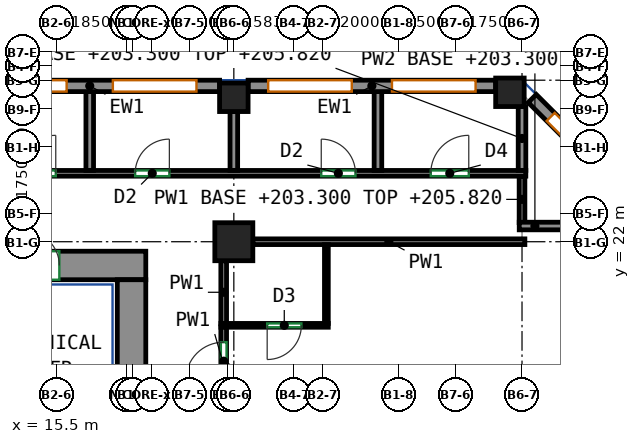
"""IFC4 building model, lengths in metres.
Left out: names, types, materials, properties, quantities, classifications, styles, units other than length and angle.
Written with IfcOpenShell. Run it as: python <this file> out.ifc"""

import sys

from ifc_helpers import new_model, si_unit, direction, frame, frame_2d, origin, origin_2d, place, context, subcontext, project, spatial, rectangle, extrude, source, transform, mapped, element, fill, save


model = new_model("IFC4")
c1 = context("Model", 3, precision=1e-05, world=origin(), true_north=direction((0.0, 1.0)))
c2 = subcontext(c1, "Body", "Model", "MODEL_VIEW")
j1 = project(units=[si_unit("LENGTHUNIT", "METRE"), si_unit("PLANEANGLEUNIT", "RADIAN")], contexts=[c1])
p1 = place(None, origin())
s1 = spatial("IfcSite", under=j1, at=p1, CompositionType="ELEMENT")
p2 = place(p1, origin())
s2 = spatial("IfcBuilding", under=s1, at=p2, CompositionType="ELEMENT")
p3 = place(p2, frame((0.0, 0.0, 203.3)))
s3 = spatial("IfcBuildingStorey", under=s2, at=p3, CompositionType="ELEMENT", Elevation=203.3)
m1 = source(origin(), c2, "Body", "SweptSolid", [
    extrude(rectangle(XDim=1.0, YDim=1.0, at=origin_2d()), origin(), (0.0, 0.0, 1.0), 3.12),
])
p4 = place(p3, frame((20.167, 22.0, 0.0), z_axis=(0.0, 0.0, 1.0), x_axis=(1.0, 0.0, 0.0)))
e1 = element("IfcColumn", 1, at=p4, inside=s3, PredefinedType="COLUMN", context=c2, shape_type="MappedRepresentation", body=[
    mapped(m1, transform((0.0, 0.0, 0.0))),
])
m2 = source(origin(), c2, "Body", "SweptSolid", [
    extrude(rectangle(XDim=0.75, YDim=0.75, at=origin_2d()), origin(), (0.0, 0.0, 1.0), 3.12),
])
for number, where, z_axis, x_axis in (
    (2, (20.167, 25.8, 0.0), (0.0, 0.0, 1.0), (1.0, 0.0, 0.0)),
    (3, (27.432, 25.932, 0.0), (0.0, 0.0, 1.0), (1.0, 0.0, 0.0)),
):
    element("IfcColumn", number, at=place(p3, frame(where, z_axis=z_axis, x_axis=x_axis)), inside=s3, PredefinedType="COLUMN", context=c2, shape_type="MappedRepresentation", body=[
        mapped(m2, transform((0.0, 0.0, 0.0))),
    ])
m3 = source(origin(), c2, "Body", "SweptSolid", [
    extrude(rectangle(XDim=33.6, YDim=0.75, at=frame_2d((16.8, 0.0))), origin(), (0.0, 0.0, 1.0), 3.12),
])
p5 = place(p3, frame((-15.75, 21.375, 0.0), z_axis=(0.0, 0.0, 1.0), x_axis=(1.0, 0.0, 0.0)))
e4 = element("IfcWall", 4, at=p5, inside=s3, PredefinedType="SHEAR", context=c2, shape_type="MappedRepresentation", body=[
    mapped(m3, transform((0.0, 0.0, 0.0))),
])
p6 = place(p5, frame((6.581, 0.0, 0.0)))
e5 = element("IfcOpeningElement", 5, at=p6, cuts=e4, PredefinedType="OPENING", context=c2, shape_type="SweptSolid", body=[
    extrude(rectangle(XDim=0.9, YDim=2.1, at=frame_2d((0.45, 1.05))), frame((0.0, 0.385, 0.0), z_axis=(0.0, -1.0, 0.0), x_axis=(1.0, 0.0, 0.0)), (0.0, 0.0, 1.0), 0.77),
])
p7 = place(p5, frame((11.888, 0.0, 0.0)))
e6 = element("IfcOpeningElement", 6, at=p7, cuts=e4, PredefinedType="OPENING", context=c2, shape_type="SweptSolid", body=[
    extrude(rectangle(XDim=0.9, YDim=2.1, at=frame_2d((0.45, 1.05))), frame((0.0, 0.385, 0.0), z_axis=(0.0, -1.0, 0.0), x_axis=(1.0, 0.0, 0.0)), (0.0, 0.0, 1.0), 0.77),
])
p8 = place(p5, frame((16.296, 0.0, 0.0)))
e7 = element("IfcOpeningElement", 7, at=p8, cuts=e4, PredefinedType="OPENING", context=c2, shape_type="SweptSolid", body=[
    extrude(rectangle(XDim=0.9, YDim=2.1, at=frame_2d((0.45, 1.05))), frame((0.0, 0.385, 0.0), z_axis=(0.0, -1.0, 0.0), x_axis=(1.0, 0.0, 0.0)), (0.0, 0.0, 1.0), 0.77),
])
p9 = place(p5, frame((18.708, 0.0, 0.0)))
e8 = element("IfcOpeningElement", 8, at=p9, cuts=e4, PredefinedType="OPENING", context=c2, shape_type="SweptSolid", body=[
    extrude(rectangle(XDim=0.9, YDim=2.1, at=frame_2d((0.45, 1.05))), frame((0.0, 0.385, 0.0), z_axis=(0.0, -1.0, 0.0), x_axis=(1.0, 0.0, 0.0)), (0.0, 0.0, 1.0), 0.77),
])
p10 = place(p5, frame((21.536, 0.0, 0.0)))
e9 = element("IfcOpeningElement", 9, at=p10, cuts=e4, PredefinedType="OPENING", context=c2, shape_type="SweptSolid", body=[
    extrude(rectangle(XDim=0.9, YDim=2.1, at=frame_2d((0.45, 1.05))), frame((0.0, 0.385, 0.0), z_axis=(0.0, -1.0, 0.0), x_axis=(1.0, 0.0, 0.0)), (0.0, 0.0, 1.0), 0.77),
])
p11 = place(p5, frame((25.877, 0.0, 0.0)))
e10 = element("IfcOpeningElement", 10, at=p11, cuts=e4, PredefinedType="OPENING", context=c2, shape_type="SweptSolid", body=[
    extrude(rectangle(XDim=0.9, YDim=2.1, at=frame_2d((0.45, 1.05))), frame((0.0, 0.385, 0.0), z_axis=(0.0, -1.0, 0.0), x_axis=(1.0, 0.0, 0.0)), (0.0, 0.0, 1.0), 0.77),
])
p12 = place(p5, frame((2.275, 0.0, 0.0)))
e11 = element("IfcOpeningElement", 11, at=p12, cuts=e4, PredefinedType="OPENING", context=c2, shape_type="SweptSolid", body=[
    extrude(rectangle(XDim=0.9, YDim=2.1, at=frame_2d((0.45, 1.05))), frame((0.0, 0.385, 0.0), z_axis=(0.0, -1.0, 0.0), x_axis=(1.0, 0.0, 0.0)), (0.0, 0.0, 1.0), 0.77),
])
p13 = place(p5, frame((30.425, 0.0, 0.0)))
e12 = element("IfcOpeningElement", 12, at=p13, cuts=e4, PredefinedType="OPENING", context=c2, shape_type="SweptSolid", body=[
    extrude(rectangle(XDim=0.9, YDim=2.1, at=frame_2d((0.45, 1.05))), frame((0.0, 0.385, 0.0), z_axis=(0.0, -1.0, 0.0), x_axis=(1.0, 0.0, 0.0)), (0.0, 0.0, 1.0), 0.77),
])
m4 = source(origin(), c2, "Body", "SweptSolid", [
    extrude(rectangle(XDim=12.0, YDim=0.75, at=frame_2d((6.0, 0.0))), origin(), (0.0, 0.0, 1.0), 3.12),
])
p14 = place(p3, frame((17.475, 9.0, 0.0), z_axis=(0.0, 0.0, 1.0), x_axis=(0.0, 1.0, 0.0)))
e13 = element("IfcWall", 13, at=p14, inside=s3, PredefinedType="SHEAR", context=c2, shape_type="MappedRepresentation", body=[
    mapped(m4, transform((0.0, 0.0, 0.0))),
])
m5 = source(origin(), c2, "Body", "SweptSolid", [
    extrude(rectangle(XDim=3.571, YDim=0.3, at=frame_2d((1.786, 0.0))), origin(), (0.0, 0.0, 1.0), 3.12),
])
p15 = place(p3, frame((30.544, 23.244, 0.0), z_axis=(0.0, 0.0, 1.0), x_axis=(-0.707140964879, 0.707072595841, 0.0)))
e14 = element("IfcWall", 14, at=p15, inside=s3, PredefinedType="SOLIDWALL", context=c2, shape_type="MappedRepresentation", body=[
    mapped(m5, transform((0.0, 0.0, 0.0))),
])
p16 = place(p15, frame((0.686, 0.0, 0.85)))
e15 = element("IfcOpeningElement", 15, at=p16, cuts=e14, PredefinedType="OPENING", context=c2, shape_type="SweptSolid", body=[
    extrude(rectangle(XDim=2.2, YDim=1.95, at=frame_2d((1.1, 0.975))), frame((0.0, 0.16, 0.0), z_axis=(0.0, -1.0, 0.0), x_axis=(1.0, 0.0, 0.0)), (0.0, 0.0, 1.0), 0.32),
])
m6 = source(origin(), c2, "Body", "SweptSolid", [
    extrude(rectangle(XDim=6.515, YDim=0.3, at=frame_2d((3.258, 0.0))), origin(), (0.0, 0.0, 1.0), 3.12),
])
p17 = place(p3, frame((27.057, 26.1, 0.0), z_axis=(0.0, 0.0, 1.0), x_axis=(-1.0, 0.0, 0.0)))
e16 = element("IfcWall", 16, at=p17, inside=s3, PredefinedType="SOLIDWALL", context=c2, shape_type="MappedRepresentation", body=[
    mapped(m6, transform((0.0, 0.0, 0.0))),
])
p18 = place(p17, frame((0.529, 0.0, 0.85)))
e17 = element("IfcOpeningElement", 17, at=p18, cuts=e16, PredefinedType="OPENING", context=c2, shape_type="SweptSolid", body=[
    extrude(rectangle(XDim=2.2, YDim=1.95, at=frame_2d((1.1, 0.975))), frame((0.0, 0.16, 0.0), z_axis=(0.0, -1.0, 0.0), x_axis=(1.0, 0.0, 0.0)), (0.0, 0.0, 1.0), 0.32),
])
p19 = place(p17, frame((3.786, 0.0, 0.85)))
e18 = element("IfcOpeningElement", 18, at=p19, cuts=e16, PredefinedType="OPENING", context=c2, shape_type="SweptSolid", body=[
    extrude(rectangle(XDim=2.2, YDim=1.95, at=frame_2d((1.1, 0.975))), frame((0.0, 0.16, 0.0), z_axis=(0.0, -1.0, 0.0), x_axis=(1.0, 0.0, 0.0)), (0.0, 0.0, 1.0), 0.32),
])
m7 = source(origin(), c2, "Body", "SweptSolid", [
    extrude(rectangle(XDim=6.833, YDim=0.3, at=frame_2d((3.417, 0.0))), origin(), (0.0, 0.0, 1.0), 3.12),
])
p20 = place(p3, frame((19.792, 26.1, 0.0), z_axis=(0.0, 0.0, 1.0), x_axis=(-1.0, 0.0, 0.0)))
e19 = element("IfcWall", 19, at=p20, inside=s3, PredefinedType="SOLIDWALL", context=c2, shape_type="MappedRepresentation", body=[
    mapped(m7, transform((0.0, 0.0, 0.0))),
])
p21 = place(p20, frame((0.608, 0.0, 0.85)))
e20 = element("IfcOpeningElement", 20, at=p21, cuts=e19, PredefinedType="OPENING", context=c2, shape_type="SweptSolid", body=[
    extrude(rectangle(XDim=2.2, YDim=1.95, at=frame_2d((1.1, 0.975))), frame((0.0, 0.16, 0.0), z_axis=(0.0, -1.0, 0.0), x_axis=(1.0, 0.0, 0.0)), (0.0, 0.0, 1.0), 0.32),
])
p22 = place(p20, frame((4.025, 0.0, 0.85)))
e21 = element("IfcOpeningElement", 21, at=p22, cuts=e19, PredefinedType="OPENING", context=c2, shape_type="SweptSolid", body=[
    extrude(rectangle(XDim=2.2, YDim=1.95, at=frame_2d((1.1, 0.975))), frame((0.0, 0.16, 0.0), z_axis=(0.0, -1.0, 0.0), x_axis=(1.0, 0.0, 0.0)), (0.0, 0.0, 1.0), 0.32),
])
p23 = place(p3, frame((19.9, 17.75, 0.0), z_axis=(0.0, 0.0, 1.0), x_axis=(0.0, 1.0, 0.0)))
e22 = element("IfcWall", 22, at=p23, inside=s3, PredefinedType="PARTITIONING", context=c2, shape_type="SweptSolid", body=[
    extrude(rectangle(XDim=2.01, YDim=0.15, at=frame_2d((1.005, 0.0))), origin(), (0.0, 0.0, 1.0), 3.12),
])
p24 = place(p23, frame((0.607, 0.0, 0.0)))
e23 = element("IfcOpeningElement", 23, at=p24, cuts=e22, PredefinedType="OPENING", context=c2, shape_type="SweptSolid", body=[
    extrude(rectangle(XDim=1.0, YDim=2.1, at=frame_2d((0.5, 1.05))), frame((0.0, 0.085, 0.0), z_axis=(0.0, -1.0, 0.0), x_axis=(1.0, 0.0, 0.0)), (0.0, 0.0, 1.0), 0.17),
])
p25 = place(p3, frame((20.667, 22.0, 0.0), z_axis=(0.0, 0.0, 1.0), x_axis=(1.0, 0.0, 0.0)))
e24 = element("IfcWall", 24, at=p25, inside=s3, PredefinedType="PARTITIONING", context=c2, shape_type="SweptSolid", body=[
    extrude(rectangle(XDim=7.158, YDim=0.15, at=frame_2d((3.579, 0.0))), origin(), (0.0, 0.0, 1.0), 3.12),
])
p26 = place(p3, frame((19.9, 19.84, 0.0), z_axis=(0.0, 0.0, 1.0), x_axis=(0.0, 1.0, 0.0)))
e25 = element("IfcWall", 25, at=p26, inside=s3, PredefinedType="PARTITIONING", context=c2, shape_type="SweptSolid", body=[
    extrude(rectangle(XDim=1.66, YDim=0.15, at=frame_2d((0.83, 0.0))), origin(), (0.0, 0.0, 1.0), 3.12),
])
p27 = place(p3, frame((27.75, 22.503, 0.0), z_axis=(0.0, 0.0, 1.0), x_axis=(0.0, 1.0, 0.0)))
e26 = element("IfcWall", 26, at=p27, inside=s3, PredefinedType="PARTITIONING", context=c2, shape_type="SweptSolid", body=[
    extrude(rectangle(XDim=1.222, YDim=0.15, at=frame_2d((0.611, 0.0))), origin(), (0.0, 0.0, 1.0), 2.52),
])
p28 = place(p3, frame((-17.85, 23.8, 0.0), z_axis=(0.0, 0.0, 1.0), x_axis=(1.0, 0.0, 0.0)))
e27 = element("IfcWall", 27, at=p28, inside=s3, PredefinedType="PARTITIONING", context=c2, shape_type="SweptSolid", body=[
    extrude(rectangle(XDim=45.7, YDim=0.15, at=frame_2d((22.85, 0.0))), origin(), (0.0, 0.0, 1.0), 3.12),
])
p29 = place(p28, frame((0.6, 0.0, 0.0)))
e28 = element("IfcOpeningElement", 28, at=p29, cuts=e27, PredefinedType="OPENING", context=c2, shape_type="SweptSolid", body=[
    extrude(rectangle(XDim=0.9, YDim=2.1, at=frame_2d((0.45, 1.05))), frame((0.0, 0.085, 0.0), z_axis=(0.0, -1.0, 0.0), x_axis=(1.0, 0.0, 0.0)), (0.0, 0.0, 1.0), 0.17),
])
p30 = place(p28, frame((4.081, 0.0, 0.0)))
e29 = element("IfcOpeningElement", 29, at=p30, cuts=e27, PredefinedType="OPENING", context=c2, shape_type="SweptSolid", body=[
    extrude(rectangle(XDim=1.0, YDim=2.1, at=frame_2d((0.5, 1.05))), frame((0.0, 0.085, 0.0), z_axis=(0.0, -1.0, 0.0), x_axis=(1.0, 0.0, 0.0)), (0.0, 0.0, 1.0), 0.17),
])
p31 = place(p28, frame((9.481, 0.0, 0.0)))
e30 = element("IfcOpeningElement", 30, at=p31, cuts=e27, PredefinedType="OPENING", context=c2, shape_type="SweptSolid", body=[
    extrude(rectangle(XDim=0.9, YDim=2.1, at=frame_2d((0.45, 1.05))), frame((0.0, 0.085, 0.0), z_axis=(0.0, -1.0, 0.0), x_axis=(1.0, 0.0, 0.0)), (0.0, 0.0, 1.0), 0.17),
])
p32 = place(p28, frame((12.803, 0.0, 0.0)))
e31 = element("IfcOpeningElement", 31, at=p32, cuts=e27, PredefinedType="OPENING", context=c2, shape_type="SweptSolid", body=[
    extrude(rectangle(XDim=1.0, YDim=2.1, at=frame_2d((0.5, 1.05))), frame((0.0, 0.085, 0.0), z_axis=(0.0, -1.0, 0.0), x_axis=(1.0, 0.0, 0.0)), (0.0, 0.0, 1.0), 0.17),
])
p33 = place(p28, frame((15.489, 0.0, 0.0)))
e32 = element("IfcOpeningElement", 32, at=p33, cuts=e27, PredefinedType="OPENING", context=c2, shape_type="SweptSolid", body=[
    extrude(rectangle(XDim=0.9, YDim=2.1, at=frame_2d((0.45, 1.05))), frame((0.0, 0.085, 0.0), z_axis=(0.0, -1.0, 0.0), x_axis=(1.0, 0.0, 0.0)), (0.0, 0.0, 1.0), 0.17),
])
p34 = place(p28, frame((21.244, 0.0, 0.0)))
e33 = element("IfcOpeningElement", 33, at=p34, cuts=e27, PredefinedType="OPENING", context=c2, shape_type="SweptSolid", body=[
    extrude(rectangle(XDim=0.9, YDim=2.1, at=frame_2d((0.45, 1.05))), frame((0.0, 0.085, 0.0), z_axis=(0.0, -1.0, 0.0), x_axis=(1.0, 0.0, 0.0)), (0.0, 0.0, 1.0), 0.17),
])
p35 = place(p28, frame((23.542, 0.0, 0.0)))
e34 = element("IfcOpeningElement", 34, at=p35, cuts=e27, PredefinedType="OPENING", context=c2, shape_type="SweptSolid", body=[
    extrude(rectangle(XDim=1.0, YDim=2.1, at=frame_2d((0.5, 1.05))), frame((0.0, 0.085, 0.0), z_axis=(0.0, -1.0, 0.0), x_axis=(1.0, 0.0, 0.0)), (0.0, 0.0, 1.0), 0.17),
])
p36 = place(p28, frame((28.841, 0.0, 0.0)))
e35 = element("IfcOpeningElement", 35, at=p36, cuts=e27, PredefinedType="OPENING", context=c2, shape_type="SweptSolid", body=[
    extrude(rectangle(XDim=0.9, YDim=2.1, at=frame_2d((0.45, 1.05))), frame((0.0, 0.085, 0.0), z_axis=(0.0, -1.0, 0.0), x_axis=(1.0, 0.0, 0.0)), (0.0, 0.0, 1.0), 0.17),
])
p37 = place(p28, frame((32.331, 0.0, 0.0)))
e36 = element("IfcOpeningElement", 36, at=p37, cuts=e27, PredefinedType="OPENING", context=c2, shape_type="SweptSolid", body=[
    extrude(rectangle(XDim=1.0, YDim=2.1, at=frame_2d((0.5, 1.05))), frame((0.0, 0.085, 0.0), z_axis=(0.0, -1.0, 0.0), x_axis=(1.0, 0.0, 0.0)), (0.0, 0.0, 1.0), 0.17),
])
p38 = place(p28, frame((35.42, 0.0, 0.0)))
e37 = element("IfcOpeningElement", 37, at=p38, cuts=e27, PredefinedType="OPENING", context=c2, shape_type="SweptSolid", body=[
    extrude(rectangle(XDim=0.9, YDim=2.1, at=frame_2d((0.45, 1.05))), frame((0.0, 0.085, 0.0), z_axis=(0.0, -1.0, 0.0), x_axis=(1.0, 0.0, 0.0)), (0.0, 0.0, 1.0), 0.17),
])
p39 = place(p28, frame((40.317, 0.0, 0.0)))
e38 = element("IfcOpeningElement", 38, at=p39, cuts=e27, PredefinedType="OPENING", context=c2, shape_type="SweptSolid", body=[
    extrude(rectangle(XDim=0.9, YDim=2.1, at=frame_2d((0.45, 1.05))), frame((0.0, 0.085, 0.0), z_axis=(0.0, -1.0, 0.0), x_axis=(1.0, 0.0, 0.0)), (0.0, 0.0, 1.0), 0.17),
])
p40 = place(p28, frame((43.199, 0.0, 0.0)))
e39 = element("IfcOpeningElement", 39, at=p40, cuts=e27, PredefinedType="OPENING", context=c2, shape_type="SweptSolid", body=[
    extrude(rectangle(XDim=1.0, YDim=2.1, at=frame_2d((0.5, 1.05))), frame((0.0, 0.085, 0.0), z_axis=(0.0, -1.0, 0.0), x_axis=(1.0, 0.0, 0.0)), (0.0, 0.0, 1.0), 0.17),
])
p41 = place(p3, frame((22.652, 19.8, 0.0), z_axis=(0.0, 0.0, 1.0), x_axis=(-1.0, 0.0, 0.0)))
e40 = element("IfcWall", 40, at=p41, inside=s3, PredefinedType="PARTITIONING", context=c2, shape_type="SweptSolid", body=[
    extrude(rectangle(XDim=2.825, YDim=0.1, at=frame_2d((1.413, 0.0))), origin(), (0.0, 0.0, 1.0), 3.12),
])
p42 = place(p41, frame((0.708, 0.0, 0.0)))
e41 = element("IfcOpeningElement", 41, at=p42, cuts=e40, PredefinedType="OPENING", context=c2, shape_type="SweptSolid", body=[
    extrude(rectangle(XDim=0.9, YDim=2.1, at=frame_2d((0.45, 1.05))), frame((0.0, 0.06, 0.0), z_axis=(0.0, -1.0, 0.0), x_axis=(1.0, 0.0, 0.0)), (0.0, 0.0, 1.0), 0.12),
])
p43 = place(p3, frame((22.602, 19.85, 0.0), z_axis=(0.0, 0.0, 1.0), x_axis=(0.0, 1.0, 0.0)))
e42 = element("IfcWall", 42, at=p43, inside=s3, PredefinedType="PARTITIONING", context=c2, shape_type="SweptSolid", body=[
    extrude(rectangle(XDim=2.073, YDim=0.1, at=frame_2d((1.037, 0.0))), origin(), (0.0, 0.0, 1.0), 3.12),
])
p44 = place(p3, frame((30.425, 22.413, 0.0), z_axis=(0.0, 0.0, 1.0), x_axis=(-1.0, 0.0, 0.0)))
e43 = element("IfcWall", 43, at=p44, inside=s3, PredefinedType="PARTITIONING", context=c2, shape_type="SweptSolid", body=[
    extrude(rectangle(XDim=2.748, YDim=0.2, at=frame_2d((1.374, 0.0))), origin(), (0.0, 0.0, 1.0), 2.52),
])
p45 = place(p44, frame((0.511, 0.0, 0.0)))
e44 = element("IfcOpeningElement", 44, at=p45, cuts=e43, PredefinedType="OPENING", context=c2, shape_type="SweptSolid", body=[
    extrude(rectangle(XDim=1.0, YDim=2.1, at=frame_2d((0.5, 1.05))), frame((0.0, 0.11, 0.0), z_axis=(0.0, -1.0, 0.0), x_axis=(1.0, 0.0, 0.0)), (0.0, 0.0, 1.0), 0.22),
])
p46 = place(p3, frame((27.75, 25.557, 0.0), z_axis=(0.0, 0.0, 1.0), x_axis=(0.0, -1.0, 0.0)))
e45 = element("IfcWall", 45, at=p46, inside=s3, PredefinedType="PARTITIONING", context=c2, shape_type="SweptSolid", body=[
    extrude(rectangle(XDim=1.68, YDim=0.2, at=frame_2d((0.84, 0.0))), origin(), (0.0, 0.0, 1.0), 2.52),
])
p47 = place(p3, frame((16.375, 23.877, 0.0), z_axis=(0.0, 0.0, 1.0), x_axis=(0.0, 1.0, 0.0)))
e46 = element("IfcWall", 46, at=p47, inside=s3, PredefinedType="PARTITIONING", context=c2, shape_type="SweptSolid", body=[
    extrude(rectangle(XDim=2.123, YDim=0.2, at=frame_2d((1.062, 0.0))), origin(), (0.0, 0.0, 1.0), 3.12),
])
p48 = place(p3, frame((20.167, 23.877, 0.0), z_axis=(0.0, 0.0, 1.0), x_axis=(0.0, 1.0, 0.0)))
e47 = element("IfcWall", 47, at=p48, inside=s3, PredefinedType="PARTITIONING", context=c2, shape_type="SweptSolid", body=[
    extrude(rectangle(XDim=1.548, YDim=0.2, at=frame_2d((0.774, 0.0))), origin(), (0.0, 0.0, 1.0), 3.12),
])
p49 = place(p3, frame((23.959, 23.877, 0.0), z_axis=(0.0, 0.0, 1.0), x_axis=(0.0, 1.0, 0.0)))
e48 = element("IfcWall", 48, at=p49, inside=s3, PredefinedType="PARTITIONING", context=c2, shape_type="SweptSolid", body=[
    extrude(rectangle(XDim=2.123, YDim=0.2, at=frame_2d((1.062, 0.0))), origin(), (0.0, 0.0, 1.0), 3.12),
])
p50 = place(p16, origin())
e49 = element("IfcWindow", 49, at=p50, inside=s3, PartitioningType="SINGLE_PANEL", PredefinedType="WINDOW", context=c2, shape_type="SweptSolid", body=[
    extrude(rectangle(XDim=2.2, YDim=1.95, at=frame_2d((1.1, 0.975))), frame((0.0, 0.03, 0.0), z_axis=(0.0, -1.0, 0.0), x_axis=(1.0, 0.0, 0.0)), (0.0, 0.0, 1.0), 0.06),
])
fill(e15, e49)
p51 = place(p18, origin())
e50 = element("IfcWindow", 50, at=p51, inside=s3, PartitioningType="SINGLE_PANEL", PredefinedType="WINDOW", context=c2, shape_type="SweptSolid", body=[
    extrude(rectangle(XDim=2.2, YDim=1.95, at=frame_2d((1.1, 0.975))), frame((0.0, 0.03, 0.0), z_axis=(0.0, -1.0, 0.0), x_axis=(1.0, 0.0, 0.0)), (0.0, 0.0, 1.0), 0.06),
])
fill(e17, e50)
p52 = place(p19, origin())
e51 = element("IfcWindow", 51, at=p52, inside=s3, PartitioningType="SINGLE_PANEL", PredefinedType="WINDOW", context=c2, shape_type="SweptSolid", body=[
    extrude(rectangle(XDim=2.2, YDim=1.95, at=frame_2d((1.1, 0.975))), frame((0.0, 0.03, 0.0), z_axis=(0.0, -1.0, 0.0), x_axis=(1.0, 0.0, 0.0)), (0.0, 0.0, 1.0), 0.06),
])
fill(e18, e51)
p53 = place(p21, origin())
e52 = element("IfcWindow", 52, at=p53, inside=s3, PartitioningType="SINGLE_PANEL", PredefinedType="WINDOW", context=c2, shape_type="SweptSolid", body=[
    extrude(rectangle(XDim=2.2, YDim=1.95, at=frame_2d((1.1, 0.975))), frame((0.0, 0.03, 0.0), z_axis=(0.0, -1.0, 0.0), x_axis=(1.0, 0.0, 0.0)), (0.0, 0.0, 1.0), 0.06),
])
fill(e20, e52)
p54 = place(p22, origin())
e53 = element("IfcWindow", 53, at=p54, inside=s3, PartitioningType="SINGLE_PANEL", PredefinedType="WINDOW", context=c2, shape_type="SweptSolid", body=[
    extrude(rectangle(XDim=2.2, YDim=1.95, at=frame_2d((1.1, 0.975))), frame((0.0, 0.03, 0.0), z_axis=(0.0, -1.0, 0.0), x_axis=(1.0, 0.0, 0.0)), (0.0, 0.0, 1.0), 0.06),
])
fill(e21, e53)
p55 = place(p13, origin())
e54 = element("IfcDoor", 54, at=p55, inside=s3, OperationType="SINGLE_SWING_LEFT", PredefinedType="DOOR", context=c2, shape_type="SweptSolid", body=[
    extrude(rectangle(XDim=0.9, YDim=2.1, at=frame_2d((0.45, 1.05))), frame((0.0, -0.23, 0.0), z_axis=(0.0, -1.0, 0.0), x_axis=(1.0, 0.0, 0.0)), (0.0, 0.0, 1.0), 0.05),
])
fill(e12, e54)
p56 = place(p24, origin())
e55 = element("IfcDoor", 55, at=p56, inside=s3, OperationType="SINGLE_SWING_LEFT", PredefinedType="DOOR", context=c2, shape_type="SweptSolid", body=[
    extrude(rectangle(XDim=1.0, YDim=2.1, at=frame_2d((0.5, 1.05))), frame((0.0, 0.025, 0.0), z_axis=(0.0, -1.0, 0.0), x_axis=(1.0, 0.0, 0.0)), (0.0, 0.0, 1.0), 0.05),
])
fill(e23, e55)
p57 = place(p42, origin())
e56 = element("IfcDoor", 56, at=p57, inside=s3, OperationType="SINGLE_SWING_RIGHT", PredefinedType="DOOR", context=c2, shape_type="SweptSolid", body=[
    extrude(rectangle(XDim=0.9, YDim=2.1, at=frame_2d((0.45, 1.05))), frame((0.0, 0.025, 0.0), z_axis=(0.0, -1.0, 0.0), x_axis=(1.0, 0.0, 0.0)), (0.0, 0.0, 1.0), 0.05),
])
fill(e41, e56)
p58 = place(p37, origin())
e57 = element("IfcDoor", 57, at=p58, inside=s3, OperationType="SINGLE_SWING_RIGHT", PredefinedType="DOOR", context=c2, shape_type="SweptSolid", body=[
    extrude(rectangle(XDim=1.0, YDim=2.1, at=frame_2d((0.5, 1.05))), frame((0.0, 0.025, 0.0), z_axis=(0.0, -1.0, 0.0), x_axis=(1.0, 0.0, 0.0)), (0.0, 0.0, 1.0), 0.05),
])
fill(e36, e57)
p59 = place(p38, origin())
e58 = element("IfcDoor", 58, at=p59, inside=s3, OperationType="SINGLE_SWING_RIGHT", PredefinedType="DOOR", context=c2, shape_type="SweptSolid", body=[
    extrude(rectangle(XDim=0.9, YDim=2.1, at=frame_2d((0.45, 1.05))), frame((0.0, 0.025, 0.0), z_axis=(0.0, -1.0, 0.0), x_axis=(1.0, 0.0, 0.0)), (0.0, 0.0, 1.0), 0.05),
])
fill(e37, e58)
p60 = place(p39, origin())
e59 = element("IfcDoor", 59, at=p60, inside=s3, OperationType="SINGLE_SWING_LEFT", PredefinedType="DOOR", context=c2, shape_type="SweptSolid", body=[
    extrude(rectangle(XDim=0.9, YDim=2.1, at=frame_2d((0.45, 1.05))), frame((0.0, 0.025, 0.0), z_axis=(0.0, -1.0, 0.0), x_axis=(1.0, 0.0, 0.0)), (0.0, 0.0, 1.0), 0.05),
])
fill(e38, e59)
p61 = place(p40, origin())
e60 = element("IfcDoor", 60, at=p61, inside=s3, OperationType="SINGLE_SWING_RIGHT", PredefinedType="DOOR", context=c2, shape_type="SweptSolid", body=[
    extrude(rectangle(XDim=1.0, YDim=2.1, at=frame_2d((0.5, 1.05))), frame((0.0, 0.025, 0.0), z_axis=(0.0, -1.0, 0.0), x_axis=(1.0, 0.0, 0.0)), (0.0, 0.0, 1.0), 0.05),
])
fill(e39, e60)
save(model, sys.argv[1])
